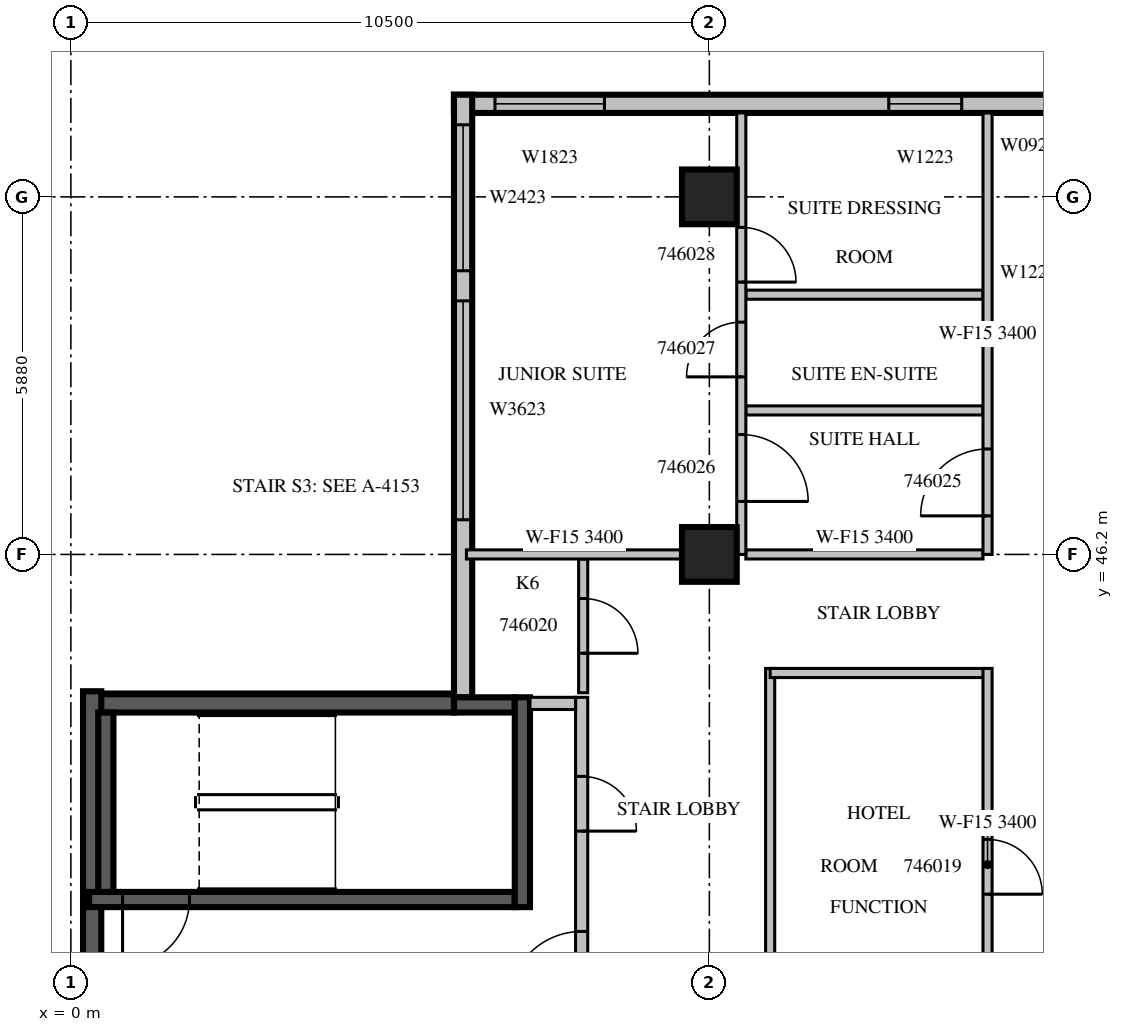
"""IFC4 building model, lengths in metres.
Left out: names, types, materials, properties, quantities, classifications, styles, units other than length and angle.
Written with IfcOpenShell. Run it as: python <this file> out.ifc"""

import sys

from ifc_helpers import new_model, si_unit, direction, frame, frame_2d, origin, origin_2d, place, context, subcontext, project, spatial, rectangle, extrude, source, transform, mapped, element, fill, save


model = new_model("IFC4")
c1 = context("Model", 3, precision=1e-05, world=origin(), true_north=direction((0.0, 1.0)))
c2 = subcontext(c1, "Body", "Model", "MODEL_VIEW")
j1 = project(units=[si_unit("LENGTHUNIT", "METRE"), si_unit("PLANEANGLEUNIT", "RADIAN")], contexts=[c1])
p1 = place(None, origin())
s1 = spatial("IfcSite", under=j1, at=p1, CompositionType="ELEMENT")
p2 = place(p1, origin())
s2 = spatial("IfcBuilding", under=s1, at=p2, CompositionType="ELEMENT")
p3 = place(p2, frame((0.0, 0.0, 208.2)))
s3 = spatial("IfcBuildingStorey", under=s2, at=p3, CompositionType="ELEMENT", Elevation=208.2)
m1 = source(origin(), c2, "Body", "SweptSolid", [
    extrude(rectangle(XDim=0.9, YDim=0.9, at=origin_2d()), origin(), (0.0, 0.0, 1.0), 3.8),
])
for number, where, z_axis, x_axis in (
    (1, (10.5, 46.2, 0.0), (0.0, 0.0, 1.0), (1.0, 0.0, 0.0)),
    (2, (10.5, 52.08, 0.0), (0.0, 0.0, 1.0), (1.0, 0.0, 0.0)),
):
    element("IfcColumn", number, at=place(p3, frame(where, z_axis=z_axis, x_axis=x_axis)), inside=s3, PredefinedType="COLUMN", context=c2, shape_type="MappedRepresentation", body=[
        mapped(m1, transform((0.0, 0.0, 0.0), scale=1.0)),
    ])
m2 = source(origin(), c2, "Body", "SweptSolid", [
    extrude(rectangle(XDim=10.5, YDim=0.3, at=frame_2d((5.25, 0.0))), origin(), (0.0, 0.0, 1.0), 3.4),
])
p4 = place(p3, frame((16.8, 53.61, 0.0), z_axis=(0.0, 0.0, 1.0), x_axis=(-1.0, 0.0, 0.0)))
e3 = element("IfcWall", 3, at=p4, inside=s3, PredefinedType="STANDARD", context=c2, shape_type="MappedRepresentation", body=[
    mapped(m2, transform((0.0, 0.0, 0.0), scale=1.0)),
])
m3 = source(origin(), c2, "Body", "SweptSolid", [
    extrude(rectangle(XDim=1.2, YDim=2.3, at=frame_2d((0.6, 1.15))), frame((0.0, 0.16, 0.0), z_axis=(0.0, -1.0, 0.0), x_axis=(1.0, 0.0, 0.0)), (0.0, 0.0, 1.0), 0.32),
])
p5 = place(p4, frame((2.15, 0.0, 0.6)))
e4 = element("IfcOpeningElement", 4, at=p5, cuts=e3, PredefinedType="OPENING", context=c2, shape_type="MappedRepresentation", body=[
    mapped(m3, transform((0.0, 0.0, 0.0), scale=1.0)),
])
m4 = source(origin(), c2, "Body", "SweptSolid", [
    extrude(rectangle(XDim=1.8, YDim=2.3, at=frame_2d((0.9, 1.15))), frame((0.0, 0.16, 0.0), z_axis=(0.0, -1.0, 0.0), x_axis=(1.0, 0.0, 0.0)), (0.0, 0.0, 1.0), 0.32),
])
p6 = place(p4, frame((8.025, 0.0, 0.6)))
e5 = element("IfcOpeningElement", 5, at=p6, cuts=e3, PredefinedType="OPENING", context=c2, shape_type="MappedRepresentation", body=[
    mapped(m4, transform((0.0, 0.0, 0.0), scale=1.0)),
])
m5 = source(origin(), c2, "Body", "SweptSolid", [
    extrude(rectangle(XDim=9.91, YDim=0.3, at=frame_2d((4.955, 0.0))), origin(), (0.0, 0.0, 1.0), 3.4),
])
p7 = place(p3, frame((6.45, 53.76, 0.0), z_axis=(0.0, 0.0, 1.0), x_axis=(0.0, -1.0, 0.0)))
e6 = element("IfcWall", 6, at=p7, inside=s3, PredefinedType="STANDARD", context=c2, shape_type="MappedRepresentation", body=[
    mapped(m5, transform((0.0, 0.0, 0.0), scale=1.0)),
])
m6 = source(origin(), c2, "Body", "SweptSolid", [
    extrude(rectangle(XDim=3.6, YDim=2.3, at=frame_2d((1.8, 1.15))), frame((0.0, 0.16, 0.0), z_axis=(0.0, -1.0, 0.0), x_axis=(1.0, 0.0, 0.0)), (0.0, 0.0, 1.0), 0.32),
])
p8 = place(p7, frame((3.39, 0.0, 0.6)))
e7 = element("IfcOpeningElement", 7, at=p8, cuts=e6, PredefinedType="OPENING", context=c2, shape_type="MappedRepresentation", body=[
    mapped(m6, transform((0.0, 0.0, 0.0), scale=1.0)),
])
m7 = source(origin(), c2, "Body", "SweptSolid", [
    extrude(rectangle(XDim=2.4, YDim=2.3, at=frame_2d((1.2, 1.15))), frame((0.0, 0.16, 0.0), z_axis=(0.0, -1.0, 0.0), x_axis=(1.0, 0.0, 0.0)), (0.0, 0.0, 1.0), 0.32),
])
p9 = place(p7, frame((0.495, 0.0, 0.6)))
e8 = element("IfcOpeningElement", 8, at=p9, cuts=e6, PredefinedType="OPENING", context=c2, shape_type="MappedRepresentation", body=[
    mapped(m7, transform((0.0, 0.0, 0.0), scale=1.0)),
])
m8 = source(origin(), c2, "Body", "SweptSolid", [
    extrude(rectangle(XDim=6.1, YDim=0.3, at=frame_2d((3.05, 0.0))), origin(), (0.0, 0.0, 1.0), 3.4),
])
p10 = place(p3, frame((6.3, 43.75, 0.0), z_axis=(0.0, 0.0, 1.0), x_axis=(-1.0, 0.0, 0.0)))
e9 = element("IfcWall", 9, at=p10, inside=s3, PredefinedType="SOLIDWALL", context=c2, shape_type="MappedRepresentation", body=[
    mapped(m8, transform((0.0, 0.0, 0.0), scale=1.0)),
])
m9 = source(origin(), c2, "Body", "SweptSolid", [
    extrude(rectangle(XDim=5.65, YDim=0.3, at=frame_2d((2.825, 0.0))), origin(), (0.0, 0.0, 1.0), 3.4),
])
p11 = place(p3, frame((0.35, 43.95, 0.0), z_axis=(0.0, 0.0, 1.0), x_axis=(0.0, -1.0, 0.0)))
e10 = element("IfcWall", 10, at=p11, inside=s3, PredefinedType="SOLIDWALL", context=c2, shape_type="MappedRepresentation", body=[
    mapped(m9, transform((0.0, 0.0, 0.0), scale=1.0)),
])
m10 = source(origin(), c2, "Body", "SweptSolid", [
    extrude(rectangle(XDim=7.0, YDim=0.25, at=frame_2d((3.5, 0.0))), origin(), (0.0, 0.0, 1.0), 3.4),
])
p12 = place(p3, frame((0.3, 40.525, 0.0), z_axis=(0.0, 0.0, 1.0), x_axis=(1.0, 0.0, 0.0)))
e11 = element("IfcWall", 11, at=p12, inside=s3, PredefinedType="SOLIDWALL", context=c2, shape_type="MappedRepresentation", body=[
    mapped(m10, transform((0.0, 0.0, 0.0), scale=1.0)),
])
m11 = source(origin(), c2, "Body", "SweptSolid", [
    extrude(rectangle(XDim=1.1, YDim=2.1, at=frame_2d((0.55, 1.05))), frame((0.0, 0.135, 0.0), z_axis=(0.0, -1.0, 0.0), x_axis=(1.0, 0.0, 0.0)), (0.0, 0.0, 1.0), 0.27),
])
p13 = place(p12, frame((0.55, 0.0, 0.0)))
e12 = element("IfcOpeningElement", 12, at=p13, cuts=e11, PredefinedType="OPENING", context=c2, shape_type="MappedRepresentation", body=[
    mapped(m11, transform((0.0, 0.0, 0.0), scale=1.0)),
])
m12 = source(origin(), c2, "Body", "SweptSolid", [
    extrude(rectangle(XDim=1.0, YDim=0.25, at=frame_2d((0.5, 0.0))), origin(), (0.0, 0.0, 1.0), 3.4),
])
p14 = place(p3, frame((6.3, 43.725, 0.0), z_axis=(0.0, 0.0, 1.0), x_axis=(1.0, 0.0, 0.0)))
e13 = element("IfcWall", 13, at=p14, inside=s3, PredefinedType="SOLIDWALL", context=c2, shape_type="MappedRepresentation", body=[
    mapped(m12, transform((0.0, 0.0, 0.0), scale=1.0)),
])
m13 = source(origin(), c2, "Body", "SweptSolid", [
    extrude(rectangle(XDim=3.45, YDim=0.25, at=frame_2d((1.725, 0.0))), origin(), (0.0, 0.0, 1.0), 3.4),
])
p15 = place(p3, frame((7.425, 40.4, 0.0), z_axis=(0.0, 0.0, 1.0), x_axis=(0.0, 1.0, 0.0)))
e14 = element("IfcWall", 14, at=p15, inside=s3, PredefinedType="SOLIDWALL", context=c2, shape_type="MappedRepresentation", body=[
    mapped(m13, transform((0.0, 0.0, 0.0), scale=1.0)),
])
m14 = source(origin(), c2, "Body", "SweptSolid", [
    extrude(rectangle(XDim=2.95, YDim=0.25, at=frame_2d((1.475, 0.0))), origin(), (0.0, 0.0, 1.0), 3.4),
])
p16 = place(p3, frame((0.575, 40.65, 0.0), z_axis=(0.0, 0.0, 1.0), x_axis=(0.0, 1.0, 0.0)))
e15 = element("IfcWall", 15, at=p16, inside=s3, PredefinedType="SOLIDWALL", context=c2, shape_type="MappedRepresentation", body=[
    mapped(m14, transform((0.0, 0.0, 0.0), scale=1.0)),
])
m15 = source(origin(), c2, "Body", "SweptSolid", [
    extrude(rectangle(XDim=5.45, YDim=0.2, at=frame_2d((2.725, 0.0))), origin(), (0.0, 0.0, 1.0), 3.4),
])
p17 = place(p3, frame((8.4, 38.4, 0.0), z_axis=(0.0, 0.0, 1.0), x_axis=(0.0, 1.0, 0.0)))
e16 = element("IfcWall", 16, at=p17, inside=s3, PredefinedType="PARTITIONING", context=c2, shape_type="MappedRepresentation", body=[
    mapped(m15, transform((0.0, 0.0, 0.0), scale=1.0)),
])
m16 = source(origin(), c2, "Body", "SweptSolid", [
    extrude(rectangle(XDim=1.2, YDim=2.1, at=frame_2d((0.6, 1.05))), frame((0.0, 0.11, 0.0), z_axis=(0.0, -1.0, 0.0), x_axis=(1.0, 0.0, 0.0)), (0.0, 0.0, 1.0), 0.22),
])
p18 = place(p17, frame((0.4, 0.0, 0.0)))
e17 = element("IfcOpeningElement", 17, at=p18, cuts=e16, PredefinedType="OPENING", context=c2, shape_type="MappedRepresentation", body=[
    mapped(m16, transform((0.0, 0.0, 0.0), scale=1.0)),
])
m17 = source(origin(), c2, "Body", "SweptSolid", [
    extrude(rectangle(XDim=0.9, YDim=2.1, at=frame_2d((0.45, 1.05))), frame((0.0, 0.11, 0.0), z_axis=(0.0, -1.0, 0.0), x_axis=(1.0, 0.0, 0.0)), (0.0, 0.0, 1.0), 0.22),
])
p19 = place(p17, frame((3.25, 0.0, 0.0)))
e18 = element("IfcOpeningElement", 18, at=p19, cuts=e16, PredefinedType="OPENING", context=c2, shape_type="MappedRepresentation", body=[
    mapped(m17, transform((0.0, 0.0, 0.0), scale=1.0)),
])
m18 = source(origin(), c2, "Body", "SweptSolid", [
    extrude(rectangle(XDim=0.75, YDim=0.2, at=frame_2d((0.375, 0.0))), origin(), (0.0, 0.0, 1.0), 3.4),
])
p20 = place(p3, frame((7.55, 43.75, 0.0), z_axis=(0.0, 0.0, 1.0), x_axis=(1.0, 0.0, 0.0)))
e19 = element("IfcWall", 19, at=p20, inside=s3, PredefinedType="PARTITIONING", context=c2, shape_type="MappedRepresentation", body=[
    mapped(m18, transform((0.0, 0.0, 0.0), scale=1.0)),
])
m19 = source(origin(), c2, "Body", "SweptSolid", [
    extrude(rectangle(XDim=6.45, YDim=0.15, at=frame_2d((3.225, 0.0))), origin(), (0.0, 0.0, 1.0), 3.4),
])
p21 = place(p3, frame((11.5, 44.325, 0.0), z_axis=(0.0, 0.0, 1.0), x_axis=(0.0, -1.0, 0.0)))
e20 = element("IfcWall", 20, at=p21, inside=s3, PredefinedType="PARTITIONING", context=c2, shape_type="MappedRepresentation", body=[
    mapped(m19, transform((0.0, 0.0, 0.0), scale=1.0)),
])
m20 = source(origin(), c2, "Body", "SweptSolid", [
    extrude(rectangle(XDim=3.575, YDim=0.15, at=frame_2d((1.788, 0.0))), origin(), (0.0, 0.0, 1.0), 3.4),
])
p22 = place(p3, frame((15.075, 44.25, 0.0), z_axis=(0.0, 0.0, 1.0), x_axis=(-1.0, 0.0, 0.0)))
e21 = element("IfcWall", 21, at=p22, inside=s3, PredefinedType="PARTITIONING", context=c2, shape_type="MappedRepresentation", body=[
    mapped(m20, transform((0.0, 0.0, 0.0), scale=1.0)),
])
p23 = place(p3, frame((15.075, 37.875, 0.0), z_axis=(0.0, 0.0, 1.0), x_axis=(0.0, 1.0, 0.0)))
e22 = element("IfcWall", 22, at=p23, inside=s3, PredefinedType="PARTITIONING", context=c2, shape_type="MappedRepresentation", body=[
    mapped(m19, transform((0.0, 0.0, 0.0), scale=1.0)),
])
m21 = source(origin(), c2, "Body", "SweptSolid", [
    extrude(rectangle(XDim=0.9, YDim=2.1, at=frame_2d((0.45, 1.05))), frame((0.0, 0.085, 0.0), z_axis=(0.0, -1.0, 0.0), x_axis=(1.0, 0.0, 0.0)), (0.0, 0.0, 1.0), 0.17),
])
p24 = place(p23, frame((2.737, 0.0, 0.0)))
e23 = element("IfcOpeningElement", 23, at=p24, cuts=e22, PredefinedType="OPENING", context=c2, shape_type="MappedRepresentation", body=[
    mapped(m21, transform((0.0, 0.0, 0.0), scale=1.0)),
])
m22 = source(origin(), c2, "Body", "SweptSolid", [
    extrude(rectangle(XDim=2.2, YDim=0.15, at=frame_2d((1.1, 0.0))), origin(), (0.0, 0.0, 1.0), 3.4),
])
p25 = place(p3, frame((8.425, 43.925, 0.0), z_axis=(0.0, 0.0, 1.0), x_axis=(0.0, 1.0, 0.0)))
e24 = element("IfcWall", 24, at=p25, inside=s3, PredefinedType="PARTITIONING", context=c2, shape_type="MappedRepresentation", body=[
    mapped(m22, transform((0.0, 0.0, 0.0), scale=1.0)),
])
p26 = place(p25, frame((0.65, 0.0, 0.0)))
e25 = element("IfcOpeningElement", 25, at=p26, cuts=e24, PredefinedType="OPENING", context=c2, shape_type="MappedRepresentation", body=[
    mapped(m21, transform((0.0, 0.0, 0.0), scale=1.0)),
])
m23 = source(origin(), c2, "Body", "SweptSolid", [
    extrude(rectangle(XDim=3.9, YDim=0.15, at=frame_2d((1.95, 0.0))), origin(), (0.0, 0.0, 1.0), 3.4),
])
for number, where, z_axis, x_axis in (
    (26, (15.0, 48.568, 0.0), (0.0, 0.0, 1.0), (-1.0, 0.0, 0.0)),
    (27, (15.0, 50.472, 0.0), (0.0, 0.0, 1.0), (-1.0, 0.0, 0.0)),
):
    element("IfcWall", number, at=place(p3, frame(where, z_axis=z_axis, x_axis=x_axis)), inside=s3, PredefinedType="PARTITIONING", context=c2, shape_type="MappedRepresentation", body=[
        mapped(m23, transform((0.0, 0.0, 0.0), scale=1.0)),
    ])
m24 = source(origin(), c2, "Body", "SweptSolid", [
    extrude(rectangle(XDim=3.546, YDim=0.15, at=frame_2d((1.773, 0.0))), origin(), (0.0, 0.0, 1.0), 3.4),
])
p27 = place(p3, frame((10.051, 46.2, 0.0), z_axis=(0.0, 0.0, 1.0), x_axis=(-1.0, 0.0, 0.0)))
e28 = element("IfcWall", 28, at=p27, inside=s3, PredefinedType="PARTITIONING", context=c2, shape_type="MappedRepresentation", body=[
    mapped(m24, transform((0.0, 0.0, 0.0), scale=1.0)),
])
p28 = place(p3, frame((15.0, 46.2, 0.0), z_axis=(0.0, 0.0, 1.0), x_axis=(-1.0, 0.0, 0.0)))
e29 = element("IfcWall", 29, at=p28, inside=s3, PredefinedType="PARTITIONING", context=c2, shape_type="MappedRepresentation", body=[
    mapped(m23, transform((0.0, 0.0, 0.0), scale=1.0)),
])
m25 = source(origin(), c2, "Body", "SweptSolid", [
    extrude(rectangle(XDim=7.26, YDim=0.15, at=frame_2d((3.63, 0.0))), origin(), (0.0, 0.0, 1.0), 3.4),
])
p29 = place(p3, frame((11.025, 46.2, 0.0), z_axis=(0.0, 0.0, 1.0), x_axis=(0.0, 1.0, 0.0)))
e30 = element("IfcWall", 30, at=p29, inside=s3, PredefinedType="PARTITIONING", context=c2, shape_type="MappedRepresentation", body=[
    mapped(m25, transform((0.0, 0.0, 0.0), scale=1.0)),
])
m26 = source(origin(), c2, "Body", "SweptSolid", [
    extrude(rectangle(XDim=1.1, YDim=2.1, at=frame_2d((0.55, 1.05))), frame((0.0, 0.085, 0.0), z_axis=(0.0, -1.0, 0.0), x_axis=(1.0, 0.0, 0.0)), (0.0, 0.0, 1.0), 0.17),
])
p30 = place(p29, frame((0.872, 0.0, 0.0)))
e31 = element("IfcOpeningElement", 31, at=p30, cuts=e30, PredefinedType="OPENING", context=c2, shape_type="MappedRepresentation", body=[
    mapped(m26, transform((0.0, 0.0, 0.0), scale=1.0)),
])
p31 = place(p29, frame((2.92, 0.0, 0.0)))
e32 = element("IfcOpeningElement", 32, at=p31, cuts=e30, PredefinedType="OPENING", context=c2, shape_type="MappedRepresentation", body=[
    mapped(m21, transform((0.0, 0.0, 0.0), scale=1.0)),
])
p32 = place(p29, frame((4.478, 0.0, 0.0)))
e33 = element("IfcOpeningElement", 33, at=p32, cuts=e30, PredefinedType="OPENING", context=c2, shape_type="MappedRepresentation", body=[
    mapped(m21, transform((0.0, 0.0, 0.0), scale=1.0)),
])
p33 = place(p3, frame((15.075, 46.2, 0.0), z_axis=(0.0, 0.0, 1.0), x_axis=(0.0, 1.0, 0.0)))
e34 = element("IfcWall", 34, at=p33, inside=s3, PredefinedType="PARTITIONING", context=c2, shape_type="MappedRepresentation", body=[
    mapped(m25, transform((0.0, 0.0, 0.0), scale=1.0)),
])
p34 = place(p33, frame((0.634, 0.0, 0.0)))
e35 = element("IfcOpeningElement", 35, at=p34, cuts=e34, PredefinedType="OPENING", context=c2, shape_type="MappedRepresentation", body=[
    mapped(m26, transform((0.0, 0.0, 0.0), scale=1.0)),
])
m27 = source(origin(), c2, "Body", "SweptSolid", [
    extrude(rectangle(XDim=1.2, YDim=2.3, at=frame_2d((0.6, 1.15))), frame((0.0, 0.03, 0.0), z_axis=(0.0, -1.0, 0.0), x_axis=(1.0, 0.0, 0.0)), (0.0, 0.0, 1.0), 0.06),
])
p35 = place(p5, origin())
e36 = element("IfcWindow", 36, at=p35, inside=s3, PartitioningType="SINGLE_PANEL", PredefinedType="WINDOW", context=c2, shape_type="MappedRepresentation", body=[
    mapped(m27, transform((0.0, 0.0, 0.0), scale=1.0)),
])
fill(e4, e36)
m28 = source(origin(), c2, "Body", "SweptSolid", [
    extrude(rectangle(XDim=1.8, YDim=2.3, at=frame_2d((0.9, 1.15))), frame((0.0, 0.03, 0.0), z_axis=(0.0, -1.0, 0.0), x_axis=(1.0, 0.0, 0.0)), (0.0, 0.0, 1.0), 0.06),
])
p36 = place(p6, origin())
e37 = element("IfcWindow", 37, at=p36, inside=s3, PartitioningType="SINGLE_PANEL", PredefinedType="WINDOW", context=c2, shape_type="MappedRepresentation", body=[
    mapped(m28, transform((0.0, 0.0, 0.0), scale=1.0)),
])
fill(e5, e37)
m29 = source(origin(), c2, "Body", "SweptSolid", [
    extrude(rectangle(XDim=3.6, YDim=2.3, at=frame_2d((1.8, 1.15))), frame((0.0, 0.03, 0.0), z_axis=(0.0, -1.0, 0.0), x_axis=(1.0, 0.0, 0.0)), (0.0, 0.0, 1.0), 0.06),
])
p37 = place(p8, origin())
e38 = element("IfcWindow", 38, at=p37, inside=s3, PartitioningType="SINGLE_PANEL", PredefinedType="WINDOW", context=c2, shape_type="MappedRepresentation", body=[
    mapped(m29, transform((0.0, 0.0, 0.0), scale=1.0)),
])
fill(e7, e38)
m30 = source(origin(), c2, "Body", "SweptSolid", [
    extrude(rectangle(XDim=2.4, YDim=2.3, at=frame_2d((1.2, 1.15))), frame((0.0, 0.03, 0.0), z_axis=(0.0, -1.0, 0.0), x_axis=(1.0, 0.0, 0.0)), (0.0, 0.0, 1.0), 0.06),
])
p38 = place(p9, origin())
e39 = element("IfcWindow", 39, at=p38, inside=s3, PartitioningType="SINGLE_PANEL", PredefinedType="WINDOW", context=c2, shape_type="MappedRepresentation", body=[
    mapped(m30, transform((0.0, 0.0, 0.0), scale=1.0)),
])
fill(e8, e39)
m31 = source(origin(), c2, "Body", "SweptSolid", [
    extrude(rectangle(XDim=1.1, YDim=2.1, at=frame_2d((0.55, 1.05))), frame((0.0, 0.025, 0.0), z_axis=(0.0, -1.0, 0.0), x_axis=(1.0, 0.0, 0.0)), (0.0, 0.0, 1.0), 0.05),
])
p39 = place(p13, origin())
e40 = element("IfcDoor", 40, at=p39, inside=s3, OperationType="SINGLE_SWING_RIGHT", PredefinedType="DOOR", context=c2, shape_type="MappedRepresentation", body=[
    mapped(m31, transform((0.0, 0.0, 0.0), scale=1.0)),
])
fill(e12, e40)
m32 = source(origin(), c2, "Body", "SweptSolid", [
    extrude(rectangle(XDim=1.2, YDim=2.1, at=frame_2d((0.6, 1.05))), frame((0.0, 0.025, 0.0), z_axis=(0.0, -1.0, 0.0), x_axis=(1.0, 0.0, 0.0)), (0.0, 0.0, 1.0), 0.05),
])
p40 = place(p18, origin())
e41 = element("IfcDoor", 41, at=p40, inside=s3, OperationType="SINGLE_SWING_LEFT", PredefinedType="DOOR", context=c2, shape_type="MappedRepresentation", body=[
    mapped(m32, transform((0.0, 0.0, 0.0), scale=1.0)),
])
fill(e17, e41)
m33 = source(origin(), c2, "Body", "SweptSolid", [
    extrude(rectangle(XDim=0.9, YDim=2.1, at=frame_2d((0.45, 1.05))), frame((0.0, 0.025, 0.0), z_axis=(0.0, -1.0, 0.0), x_axis=(1.0, 0.0, 0.0)), (0.0, 0.0, 1.0), 0.05),
])
p41 = place(p19, origin())
e42 = element("IfcDoor", 42, at=p41, inside=s3, OperationType="SINGLE_SWING_RIGHT", PredefinedType="DOOR", context=c2, shape_type="MappedRepresentation", body=[
    mapped(m33, transform((0.0, 0.0, 0.0), scale=1.0)),
])
fill(e18, e42)
p42 = place(p24, origin())
e43 = element("IfcDoor", 43, at=p42, inside=s3, OperationType="SINGLE_SWING_RIGHT", PredefinedType="DOOR", context=c2, shape_type="MappedRepresentation", body=[
    mapped(m33, transform((0.0, 0.0, 0.0), scale=1.0)),
])
fill(e23, e43)
p43 = place(p26, origin())
e44 = element("IfcDoor", 44, at=p43, inside=s3, OperationType="SINGLE_SWING_RIGHT", PredefinedType="DOOR", context=c2, shape_type="MappedRepresentation", body=[
    mapped(m33, transform((0.0, 0.0, 0.0), scale=1.0)),
])
fill(e25, e44)
p44 = place(p34, origin())
e45 = element("IfcDoor", 45, at=p44, inside=s3, OperationType="SINGLE_SWING_LEFT", PredefinedType="DOOR", context=c2, shape_type="MappedRepresentation", body=[
    mapped(m31, transform((0.0, 0.0, 0.0), scale=1.0)),
])
fill(e35, e45)
p45 = place(p30, origin())
e46 = element("IfcDoor", 46, at=p45, inside=s3, OperationType="SINGLE_SWING_RIGHT", PredefinedType="DOOR", context=c2, shape_type="MappedRepresentation", body=[
    mapped(m31, transform((0.0, 0.0, 0.0), scale=1.0)),
])
fill(e31, e46)
p46 = place(p31, origin())
e47 = element("IfcDoor", 47, at=p46, inside=s3, OperationType="SINGLE_SWING_LEFT", PredefinedType="DOOR", context=c2, shape_type="MappedRepresentation", body=[
    mapped(m33, transform((0.0, 0.0, 0.0), scale=1.0)),
])
fill(e32, e47)
p47 = place(p32, origin())
e48 = element("IfcDoor", 48, at=p47, inside=s3, OperationType="SINGLE_SWING_RIGHT", PredefinedType="DOOR", context=c2, shape_type="MappedRepresentation", body=[
    mapped(m33, transform((0.0, 0.0, 0.0), scale=1.0)),
])
fill(e33, e48)
save(model, sys.argv[1])
